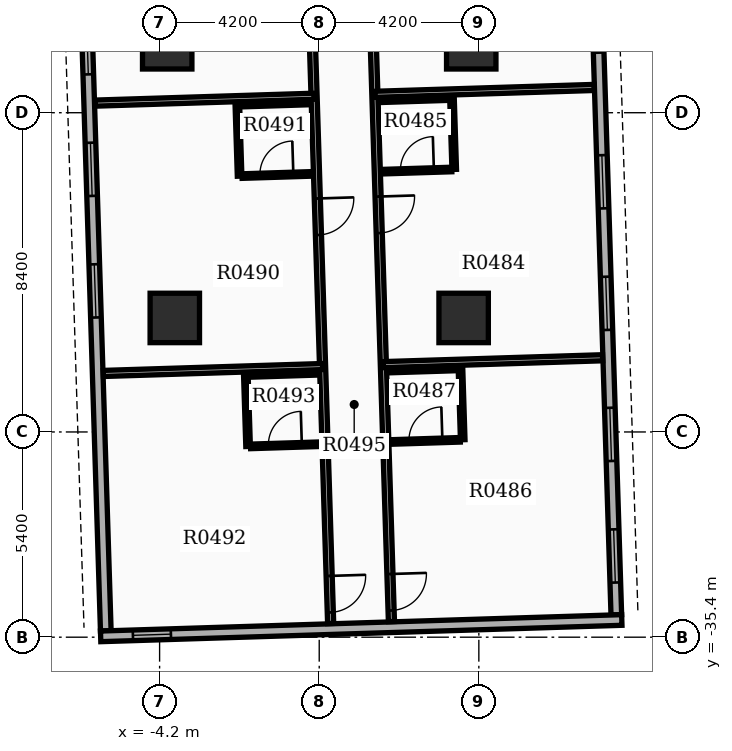
"""IFC4 building model, lengths in metres.
Left out: names, types, materials, properties, quantities, classifications, styles, units other than length and angle.
Written with IfcOpenShell. Run it as: python <this file> out.ifc"""

import sys

from ifc_helpers import new_model, si_unit, direction, frame, frame_2d, origin, origin_2d, place, context, subcontext, project, spatial, rectangle, extrude, element, fill, save


model = new_model("IFC4")
c1 = context("Model", 3, precision=1e-05, world=origin(), true_north=direction((0.0, 1.0)))
c2 = subcontext(c1, "Body", "Model", "MODEL_VIEW")
j1 = project(units=[si_unit("LENGTHUNIT", "METRE"), si_unit("PLANEANGLEUNIT", "RADIAN")], contexts=[c1])
p1 = place(None, origin())
s1 = spatial("IfcSite", under=j1, at=p1, CompositionType="ELEMENT")
p2 = place(p1, origin())
s2 = spatial("IfcBuilding", under=s1, at=p2, CompositionType="ELEMENT")
p3 = place(p2, frame((0.0, 0.0, 31.5)))
s3 = spatial("IfcBuildingStorey", under=s2, at=p3, CompositionType="ELEMENT", Elevation=31.5)
for number, where, z_axis, x_axis in (
    (1, (-4.0, -19.8, 0.0), (0.0, 0.0, 1.0), (1.0, 0.0, 0.0)),
    (2, (4.0, -19.8, 0.0), (0.0, 0.0, 1.0), (1.0, 0.0, 0.0)),
    (3, (-3.8, -27.0, 0.0), (0.0, 0.0, 1.0), (1.0, 0.0, 0.0)),
    (4, (3.8, -27.0, 0.0), (0.0, 0.0, 1.0), (1.0, 0.0, 0.0)),
):
    element("IfcColumn", number, at=place(p3, frame(where, z_axis=z_axis, x_axis=x_axis)), inside=s3, PredefinedType="COLUMN", context=c2, shape_type="SweptSolid", body=[
        extrude(rectangle(XDim=1.3, YDim=1.3, at=origin_2d()), origin(), (0.0, 0.0, 1.0), 3.9),
    ])
p4 = place(p3, frame((-6.247, -15.144, 0.0), z_axis=(0.0, 0.0, 1.0), x_axis=(0.031398187845, -0.999506955354, 0.0)))
e5 = element("IfcWall", 5, at=p4, inside=s3, PredefinedType="STANDARD", context=c2, shape_type="SweptSolid", body=[
    extrude(rectangle(XDim=20.1, YDim=0.28, at=frame_2d((10.05, 0.0))), origin(), (0.0, 0.0, 1.0), 2.91),
])
p5 = place(p4, frame((0.85, 0.0, 0.8)))
e6 = element("IfcOpeningElement", 6, at=p5, cuts=e5, PredefinedType="OPENING", context=c2, shape_type="SweptSolid", body=[
    extrude(rectangle(XDim=1.4, YDim=1.6, at=frame_2d((0.7, 0.8))), frame((0.0, 0.15, 0.0), z_axis=(0.0, -1.0, 0.0), x_axis=(1.0, 0.0, 0.0)), (0.0, 0.0, 1.0), 0.3),
])
p6 = place(p4, frame((4.05, 0.0, 0.8)))
e7 = element("IfcOpeningElement", 7, at=p6, cuts=e5, PredefinedType="OPENING", context=c2, shape_type="SweptSolid", body=[
    extrude(rectangle(XDim=1.4, YDim=1.6, at=frame_2d((0.7, 0.8))), frame((0.0, 0.15, 0.0), z_axis=(0.0, -1.0, 0.0), x_axis=(1.0, 0.0, 0.0)), (0.0, 0.0, 1.0), 0.3),
])
p7 = place(p4, frame((7.25, 0.0, 0.8)))
e8 = element("IfcOpeningElement", 8, at=p7, cuts=e5, PredefinedType="OPENING", context=c2, shape_type="SweptSolid", body=[
    extrude(rectangle(XDim=1.4, YDim=1.6, at=frame_2d((0.7, 0.8))), frame((0.0, 0.15, 0.0), z_axis=(0.0, -1.0, 0.0), x_axis=(1.0, 0.0, 0.0)), (0.0, 0.0, 1.0), 0.3),
])
p8 = place(p4, frame((10.45, 0.0, 0.8)))
e9 = element("IfcOpeningElement", 9, at=p8, cuts=e5, PredefinedType="OPENING", context=c2, shape_type="SweptSolid", body=[
    extrude(rectangle(XDim=1.4, YDim=1.6, at=frame_2d((0.7, 0.8))), frame((0.0, 0.15, 0.0), z_axis=(0.0, -1.0, 0.0), x_axis=(1.0, 0.0, 0.0)), (0.0, 0.0, 1.0), 0.3),
])
p9 = place(p3, frame((7.817, -34.812, 0.0), z_axis=(0.0, 0.0, 1.0), x_axis=(-0.031410322165, 0.999506574096, 0.0)))
e10 = element("IfcWall", 10, at=p9, inside=s3, PredefinedType="STANDARD", context=c2, shape_type="SweptSolid", body=[
    extrude(rectangle(XDim=20.1, YDim=0.28, at=frame_2d((10.05, 0.0))), origin(), (0.0, 0.0, 1.0), 2.91),
])
p10 = place(p9, frame((0.85, 0.0, 0.8)))
e11 = element("IfcOpeningElement", 11, at=p10, cuts=e10, PredefinedType="OPENING", context=c2, shape_type="SweptSolid", body=[
    extrude(rectangle(XDim=1.4, YDim=1.6, at=frame_2d((0.7, 0.8))), frame((0.0, 0.15, 0.0), z_axis=(0.0, -1.0, 0.0), x_axis=(1.0, 0.0, 0.0)), (0.0, 0.0, 1.0), 0.3),
])
p11 = place(p9, frame((4.05, 0.0, 0.8)))
e12 = element("IfcOpeningElement", 12, at=p11, cuts=e10, PredefinedType="OPENING", context=c2, shape_type="SweptSolid", body=[
    extrude(rectangle(XDim=1.4, YDim=1.6, at=frame_2d((0.7, 0.8))), frame((0.0, 0.15, 0.0), z_axis=(0.0, -1.0, 0.0), x_axis=(1.0, 0.0, 0.0)), (0.0, 0.0, 1.0), 0.3),
])
p12 = place(p9, frame((7.5, 0.0, 0.8)))
e13 = element("IfcOpeningElement", 13, at=p12, cuts=e10, PredefinedType="OPENING", context=c2, shape_type="SweptSolid", body=[
    extrude(rectangle(XDim=1.4, YDim=1.6, at=frame_2d((0.7, 0.8))), frame((0.0, 0.15, 0.0), z_axis=(0.0, -1.0, 0.0), x_axis=(1.0, 0.0, 0.0)), (0.0, 0.0, 1.0), 0.3),
])
p13 = place(p9, frame((10.7, 0.0, 0.8)))
e14 = element("IfcOpeningElement", 14, at=p13, cuts=e10, PredefinedType="OPENING", context=c2, shape_type="SweptSolid", body=[
    extrude(rectangle(XDim=1.4, YDim=1.6, at=frame_2d((0.7, 0.8))), frame((0.0, 0.15, 0.0), z_axis=(0.0, -1.0, 0.0), x_axis=(1.0, 0.0, 0.0)), (0.0, 0.0, 1.0), 0.3),
])
p14 = place(p9, frame((14.799, 0.0, 0.85)))
e15 = element("IfcOpeningElement", 15, at=p14, cuts=e10, PredefinedType="OPENING", context=c2, shape_type="SweptSolid", body=[
    extrude(rectangle(XDim=1.2, YDim=1.6, at=frame_2d((0.6, 0.8))), frame((0.0, 0.15, 0.0), z_axis=(0.0, -1.0, 0.0), x_axis=(1.0, 0.0, 0.0)), (0.0, 0.0, 1.0), 0.3),
])
p15 = place(p3, frame((-5.752, -35.378, 0.0), z_axis=(0.0, 0.0, 1.0), x_axis=(0.999506679556, 0.031406966164, 0.0)))
e16 = element("IfcWall", 16, at=p15, inside=s3, PredefinedType="STANDARD", context=c2, shape_type="SweptSolid", body=[
    extrude(rectangle(XDim=13.72, YDim=0.28, at=frame_2d((6.86, 0.0))), origin(), (0.0, 0.0, 1.0), 2.91),
])
p16 = place(p15, frame((0.85, 0.0, 0.85)))
e17 = element("IfcOpeningElement", 17, at=p16, cuts=e16, PredefinedType="OPENING", context=c2, shape_type="SweptSolid", body=[
    extrude(rectangle(XDim=1.0, YDim=1.5, at=frame_2d((0.5, 0.75))), frame((0.0, 0.15, 0.0), z_axis=(0.0, -1.0, 0.0), x_axis=(1.0, 0.0, 0.0)), (0.0, 0.0, 1.0), 0.3),
])
p17 = place(p3, frame((1.266, -14.817, 0.0), z_axis=(0.0, 0.0, 1.0), x_axis=(0.031403565719, -0.9995067864, 0.0)))
e18 = element("IfcWall", 18, at=p17, inside=s3, PredefinedType="PARTITIONING", context=c2, shape_type="SweptSolid", body=[
    extrude(rectangle(XDim=20.182, YDim=0.16, at=frame_2d((10.091, 0.0))), origin(), (0.0, 0.0, 1.0), 2.9),
])
p18 = place(p17, frame((2.61, 0.0, 0.0)))
e19 = element("IfcOpeningElement", 19, at=p18, cuts=e18, PredefinedType="OPENING", context=c2, shape_type="SweptSolid", body=[
    extrude(rectangle(XDim=0.96, YDim=2.15, at=frame_2d((0.48, 1.075))), frame((0.0, 0.09, 0.0), z_axis=(0.0, -1.0, 0.0), x_axis=(1.0, 0.0, 0.0)), (0.0, 0.0, 1.0), 0.18),
])
p19 = place(p17, frame((8.994, 0.0, 0.0)))
e20 = element("IfcOpeningElement", 20, at=p19, cuts=e18, PredefinedType="OPENING", context=c2, shape_type="SweptSolid", body=[
    extrude(rectangle(XDim=0.96, YDim=2.15, at=frame_2d((0.48, 1.075))), frame((0.0, 0.09, 0.0), z_axis=(0.0, -1.0, 0.0), x_axis=(1.0, 0.0, 0.0)), (0.0, 0.0, 1.0), 0.18),
])
p20 = place(p17, frame((18.93, 0.0, 0.0)))
e21 = element("IfcOpeningElement", 21, at=p20, cuts=e18, PredefinedType="OPENING", context=c2, shape_type="SweptSolid", body=[
    extrude(rectangle(XDim=0.96, YDim=2.15, at=frame_2d((0.48, 1.075))), frame((0.0, 0.09, 0.0), z_axis=(0.0, -1.0, 0.0), x_axis=(1.0, 0.0, 0.0)), (0.0, 0.0, 1.0), 0.18),
])
p21 = place(p3, frame((1.464, -21.116, 0.0), z_axis=(0.0, 0.0, 1.0), x_axis=(0.999506032581, 0.031427548972, 0.0)))
e22 = element("IfcWall", 22, at=p21, inside=s3, PredefinedType="PARTITIONING", context=c2, shape_type="SweptSolid", body=[
    extrude(rectangle(XDim=5.772, YDim=0.16, at=frame_2d((2.886, 0.0))), origin(), (0.0, 0.0, 1.0), 2.9),
])
p22 = place(p3, frame((1.688, -28.229, 0.0), z_axis=(0.0, 0.0, 1.0), x_axis=(0.999506074356, 0.031426220357, 0.0)))
e23 = element("IfcWall", 23, at=p22, inside=s3, PredefinedType="PARTITIONING", context=c2, shape_type="SweptSolid", body=[
    extrude(rectangle(XDim=5.772, YDim=0.16, at=frame_2d((2.886, 0.0))), origin(), (0.0, 0.0, 1.0), 2.9),
])
p23 = place(p3, frame((1.668, -23.151, 0.0), z_axis=(0.0, 0.0, 1.0), x_axis=(0.999511421504, 0.031255692016, 0.0)))
e24 = element("IfcWall", 24, at=p23, inside=s3, PredefinedType="PARTITIONING", context=c2, shape_type="SweptSolid", body=[
    extrude(rectangle(XDim=1.82, YDim=0.12, at=frame_2d((0.91, 0.0))), origin(), (0.0, 0.0, 1.0), 2.9),
])
p24 = place(p23, frame((0.47, 0.0, 0.0)))
e25 = element("IfcOpeningElement", 25, at=p24, cuts=e24, PredefinedType="OPENING", context=c2, shape_type="SweptSolid", body=[
    extrude(rectangle(XDim=0.88, YDim=2.1, at=frame_2d((0.44, 1.05))), frame((0.0, 0.07, 0.0), z_axis=(0.0, -1.0, 0.0), x_axis=(1.0, 0.0, 0.0)), (0.0, 0.0, 1.0), 0.14),
])
p25 = place(p3, frame((1.609, -21.272, 0.0), z_axis=(0.0, 0.0, 1.0), x_axis=(0.999507221803, 0.031389704724, 0.0)))
e26 = element("IfcWall", 26, at=p25, inside=s3, PredefinedType="PARTITIONING", context=c2, shape_type="SweptSolid", body=[
    extrude(rectangle(XDim=1.82, YDim=0.12, at=frame_2d((0.91, 0.0))), origin(), (0.0, 0.0, 1.0), 2.9),
])
p26 = place(p3, frame((3.493, -21.213, 0.0), z_axis=(0.0, 0.0, 1.0), x_axis=(0.031425292588, -0.999506103526, 0.0)))
e27 = element("IfcWall", 27, at=p26, inside=s3, PredefinedType="PARTITIONING", context=c2, shape_type="SweptSolid", body=[
    extrude(rectangle(XDim=1.88, YDim=0.12, at=frame_2d((0.94, 0.0))), origin(), (0.0, 0.0, 1.0), 2.9),
])
p27 = place(p3, frame((1.892, -30.263, 0.0), z_axis=(0.0, 0.0, 1.0), x_axis=(0.999507221803, 0.031389704724, 0.0)))
e28 = element("IfcWall", 28, at=p27, inside=s3, PredefinedType="PARTITIONING", context=c2, shape_type="SweptSolid", body=[
    extrude(rectangle(XDim=1.82, YDim=0.12, at=frame_2d((0.91, 0.0))), origin(), (0.0, 0.0, 1.0), 2.9),
])
p28 = place(p27, frame((0.47, 0.0, 0.0)))
e29 = element("IfcOpeningElement", 29, at=p28, cuts=e28, PredefinedType="OPENING", context=c2, shape_type="SweptSolid", body=[
    extrude(rectangle(XDim=0.88, YDim=2.1, at=frame_2d((0.44, 1.05))), frame((0.0, 0.07, 0.0), z_axis=(0.0, -1.0, 0.0), x_axis=(1.0, 0.0, 0.0)), (0.0, 0.0, 1.0), 0.14),
])
p29 = place(p3, frame((1.833, -28.385, 0.0), z_axis=(0.0, 0.0, 1.0), x_axis=(0.999507221803, 0.031389704724, 0.0)))
e30 = element("IfcWall", 30, at=p29, inside=s3, PredefinedType="PARTITIONING", context=c2, shape_type="SweptSolid", body=[
    extrude(rectangle(XDim=1.82, YDim=0.12, at=frame_2d((0.91, 0.0))), origin(), (0.0, 0.0, 1.0), 2.9),
])
p30 = place(p3, frame((3.717, -28.325, 0.0), z_axis=(0.0, 0.0, 1.0), x_axis=(0.031425292588, -0.999506103526, 0.0)))
e31 = element("IfcWall", 31, at=p30, inside=s3, PredefinedType="PARTITIONING", context=c2, shape_type="SweptSolid", body=[
    extrude(rectangle(XDim=1.88, YDim=0.12, at=frame_2d((0.94, 0.0))), origin(), (0.0, 0.0, 1.0), 2.9),
])
p31 = place(p3, frame((-0.333, -14.868, 0.0), z_axis=(0.0, 0.0, 1.0), x_axis=(0.031416030536, -0.99950639469, 0.0)))
e32 = element("IfcWall", 32, at=p31, inside=s3, PredefinedType="PARTITIONING", context=c2, shape_type="SweptSolid", body=[
    extrude(rectangle(XDim=20.182, YDim=0.16, at=frame_2d((10.091, 0.0))), origin(), (0.0, 0.0, 1.0), 2.9),
])
p32 = place(p31, frame((2.61, 0.0, 0.0)))
e33 = element("IfcOpeningElement", 33, at=p32, cuts=e32, PredefinedType="OPENING", context=c2, shape_type="SweptSolid", body=[
    extrude(rectangle(XDim=0.96, YDim=2.15, at=frame_2d((0.48, 1.075))), frame((0.0, 0.09, 0.0), z_axis=(0.0, -1.0, 0.0), x_axis=(1.0, 0.0, 0.0)), (0.0, 0.0, 1.0), 0.18),
])
p33 = place(p31, frame((8.994, 0.0, 0.0)))
e34 = element("IfcOpeningElement", 34, at=p33, cuts=e32, PredefinedType="OPENING", context=c2, shape_type="SweptSolid", body=[
    extrude(rectangle(XDim=0.96, YDim=2.15, at=frame_2d((0.48, 1.075))), frame((0.0, 0.09, 0.0), z_axis=(0.0, -1.0, 0.0), x_axis=(1.0, 0.0, 0.0)), (0.0, 0.0, 1.0), 0.18),
])
p34 = place(p31, frame((18.93, 0.0, 0.0)))
e35 = element("IfcOpeningElement", 35, at=p34, cuts=e32, PredefinedType="OPENING", context=c2, shape_type="SweptSolid", body=[
    extrude(rectangle(XDim=0.96, YDim=2.15, at=frame_2d((0.48, 1.075))), frame((0.0, 0.09, 0.0), z_axis=(0.0, -1.0, 0.0), x_axis=(1.0, 0.0, 0.0)), (0.0, 0.0, 1.0), 0.18),
])
p35 = place(p3, frame((-0.135, -21.167, 0.0), z_axis=(0.0, 0.0, 1.0), x_axis=(-0.999507360361, -0.031385292484, 0.0)))
e36 = element("IfcWall", 36, at=p35, inside=s3, PredefinedType="PARTITIONING", context=c2, shape_type="SweptSolid", body=[
    extrude(rectangle(XDim=5.772, YDim=0.16, at=frame_2d((2.886, 0.0))), origin(), (0.0, 0.0, 1.0), 2.9),
])
p36 = place(p3, frame((0.088, -28.279, 0.0), z_axis=(0.0, 0.0, 1.0), x_axis=(-0.999507402024, -0.031383965651, 0.0)))
e37 = element("IfcWall", 37, at=p36, inside=s3, PredefinedType="PARTITIONING", context=c2, shape_type="SweptSolid", body=[
    extrude(rectangle(XDim=5.772, YDim=0.16, at=frame_2d((2.886, 0.0))), origin(), (0.0, 0.0, 1.0), 2.9),
])
p37 = place(p3, frame((-2.03, -23.267, 0.0), z_axis=(0.0, 0.0, 1.0), x_axis=(0.999511421504, 0.031255692016, 0.0)))
e38 = element("IfcWall", 38, at=p37, inside=s3, PredefinedType="PARTITIONING", context=c2, shape_type="SweptSolid", body=[
    extrude(rectangle(XDim=1.82, YDim=0.12, at=frame_2d((0.91, 0.0))), origin(), (0.0, 0.0, 1.0), 2.9),
])
p38 = place(p37, frame((0.47, 0.0, 0.0)))
e39 = element("IfcOpeningElement", 39, at=p38, cuts=e38, PredefinedType="OPENING", context=c2, shape_type="SweptSolid", body=[
    extrude(rectangle(XDim=0.88, YDim=2.1, at=frame_2d((0.44, 1.05))), frame((0.0, 0.07, 0.0), z_axis=(0.0, -1.0, 0.0), x_axis=(1.0, 0.0, 0.0)), (0.0, 0.0, 1.0), 0.14),
])
p39 = place(p3, frame((-2.089, -21.388, 0.0), z_axis=(0.0, 0.0, 1.0), x_axis=(0.999507221803, 0.031389704724, 0.0)))
e40 = element("IfcWall", 40, at=p39, inside=s3, PredefinedType="PARTITIONING", context=c2, shape_type="SweptSolid", body=[
    extrude(rectangle(XDim=1.82, YDim=0.12, at=frame_2d((0.91, 0.0))), origin(), (0.0, 0.0, 1.0), 2.9),
])
p40 = place(p3, frame((-2.154, -21.39, 0.0), z_axis=(0.0, 0.0, 1.0), x_axis=(0.031425292588, -0.999506103526, 0.0)))
e41 = element("IfcWall", 41, at=p40, inside=s3, PredefinedType="PARTITIONING", context=c2, shape_type="SweptSolid", body=[
    extrude(rectangle(XDim=1.88, YDim=0.12, at=frame_2d((0.94, 0.0))), origin(), (0.0, 0.0, 1.0), 2.9),
])
p41 = place(p3, frame((-1.807, -30.38, 0.0), z_axis=(0.0, 0.0, 1.0), x_axis=(0.999507221803, 0.031389704724, 0.0)))
e42 = element("IfcWall", 42, at=p41, inside=s3, PredefinedType="PARTITIONING", context=c2, shape_type="SweptSolid", body=[
    extrude(rectangle(XDim=1.82, YDim=0.12, at=frame_2d((0.91, 0.0))), origin(), (0.0, 0.0, 1.0), 2.9),
])
p42 = place(p41, frame((0.47, 0.0, 0.0)))
e43 = element("IfcOpeningElement", 43, at=p42, cuts=e42, PredefinedType="OPENING", context=c2, shape_type="SweptSolid", body=[
    extrude(rectangle(XDim=0.88, YDim=2.1, at=frame_2d((0.44, 1.05))), frame((0.0, 0.07, 0.0), z_axis=(0.0, -1.0, 0.0), x_axis=(1.0, 0.0, 0.0)), (0.0, 0.0, 1.0), 0.14),
])
p43 = place(p3, frame((-1.866, -28.501, 0.0), z_axis=(0.0, 0.0, 1.0), x_axis=(0.999507221803, 0.031389704724, 0.0)))
e44 = element("IfcWall", 44, at=p43, inside=s3, PredefinedType="PARTITIONING", context=c2, shape_type="SweptSolid", body=[
    extrude(rectangle(XDim=1.82, YDim=0.12, at=frame_2d((0.91, 0.0))), origin(), (0.0, 0.0, 1.0), 2.9),
])
p44 = place(p3, frame((-1.931, -28.503, 0.0), z_axis=(0.0, 0.0, 1.0), x_axis=(0.031425292588, -0.999506103526, 0.0)))
e45 = element("IfcWall", 45, at=p44, inside=s3, PredefinedType="PARTITIONING", context=c2, shape_type="SweptSolid", body=[
    extrude(rectangle(XDim=1.88, YDim=0.12, at=frame_2d((0.94, 0.0))), origin(), (0.0, 0.0, 1.0), 2.9),
])
p45 = place(p6, origin())
e46 = element("IfcWindow", 46, at=p45, inside=s3, PartitioningType="SINGLE_PANEL", PredefinedType="WINDOW", context=c2, shape_type="SweptSolid", body=[
    extrude(rectangle(XDim=1.4, YDim=1.6, at=frame_2d((0.7, 0.8))), frame((0.0, 0.03, 0.0), z_axis=(0.0, -1.0, 0.0), x_axis=(1.0, 0.0, 0.0)), (0.0, 0.0, 1.0), 0.06),
])
fill(e7, e46)
p46 = place(p7, origin())
e47 = element("IfcWindow", 47, at=p46, inside=s3, PartitioningType="SINGLE_PANEL", PredefinedType="WINDOW", context=c2, shape_type="SweptSolid", body=[
    extrude(rectangle(XDim=1.4, YDim=1.6, at=frame_2d((0.7, 0.8))), frame((0.0, 0.03, 0.0), z_axis=(0.0, -1.0, 0.0), x_axis=(1.0, 0.0, 0.0)), (0.0, 0.0, 1.0), 0.06),
])
fill(e8, e47)
p47 = place(p8, origin())
e48 = element("IfcWindow", 48, at=p47, inside=s3, PartitioningType="SINGLE_PANEL", PredefinedType="WINDOW", context=c2, shape_type="SweptSolid", body=[
    extrude(rectangle(XDim=1.4, YDim=1.6, at=frame_2d((0.7, 0.8))), frame((0.0, 0.03, 0.0), z_axis=(0.0, -1.0, 0.0), x_axis=(1.0, 0.0, 0.0)), (0.0, 0.0, 1.0), 0.06),
])
fill(e9, e48)
p48 = place(p10, origin())
e49 = element("IfcWindow", 49, at=p48, inside=s3, PartitioningType="SINGLE_PANEL", PredefinedType="WINDOW", context=c2, shape_type="SweptSolid", body=[
    extrude(rectangle(XDim=1.4, YDim=1.6, at=frame_2d((0.7, 0.8))), frame((0.0, 0.03, 0.0), z_axis=(0.0, -1.0, 0.0), x_axis=(1.0, 0.0, 0.0)), (0.0, 0.0, 1.0), 0.06),
])
fill(e11, e49)
p49 = place(p11, origin())
e50 = element("IfcWindow", 50, at=p49, inside=s3, PartitioningType="SINGLE_PANEL", PredefinedType="WINDOW", context=c2, shape_type="SweptSolid", body=[
    extrude(rectangle(XDim=1.4, YDim=1.6, at=frame_2d((0.7, 0.8))), frame((0.0, 0.03, 0.0), z_axis=(0.0, -1.0, 0.0), x_axis=(1.0, 0.0, 0.0)), (0.0, 0.0, 1.0), 0.06),
])
fill(e12, e50)
p50 = place(p12, origin())
e51 = element("IfcWindow", 51, at=p50, inside=s3, PartitioningType="SINGLE_PANEL", PredefinedType="WINDOW", context=c2, shape_type="SweptSolid", body=[
    extrude(rectangle(XDim=1.4, YDim=1.6, at=frame_2d((0.7, 0.8))), frame((0.0, 0.03, 0.0), z_axis=(0.0, -1.0, 0.0), x_axis=(1.0, 0.0, 0.0)), (0.0, 0.0, 1.0), 0.06),
])
fill(e13, e51)
p51 = place(p13, origin())
e52 = element("IfcWindow", 52, at=p51, inside=s3, PartitioningType="SINGLE_PANEL", PredefinedType="WINDOW", context=c2, shape_type="SweptSolid", body=[
    extrude(rectangle(XDim=1.4, YDim=1.6, at=frame_2d((0.7, 0.8))), frame((0.0, 0.03, 0.0), z_axis=(0.0, -1.0, 0.0), x_axis=(1.0, 0.0, 0.0)), (0.0, 0.0, 1.0), 0.06),
])
fill(e14, e52)
p52 = place(p16, origin())
e53 = element("IfcWindow", 53, at=p52, inside=s3, PartitioningType="SINGLE_PANEL", PredefinedType="WINDOW", context=c2, shape_type="SweptSolid", body=[
    extrude(rectangle(XDim=1.0, YDim=1.5, at=frame_2d((0.5, 0.75))), frame((0.0, 0.03, 0.0), z_axis=(0.0, -1.0, 0.0), x_axis=(1.0, 0.0, 0.0)), (0.0, 0.0, 1.0), 0.06),
])
fill(e17, e53)
p53 = place(p14, origin())
e54 = element("IfcWindow", 54, at=p53, inside=s3, PartitioningType="SINGLE_PANEL", PredefinedType="WINDOW", context=c2, shape_type="SweptSolid", body=[
    extrude(rectangle(XDim=1.2, YDim=1.6, at=frame_2d((0.6, 0.8))), frame((0.0, 0.03, 0.0), z_axis=(0.0, -1.0, 0.0), x_axis=(1.0, 0.0, 0.0)), (0.0, 0.0, 1.0), 0.06),
])
fill(e15, e54)
p54 = place(p19, origin())
e55 = element("IfcDoor", 55, at=p54, inside=s3, OperationType="SINGLE_SWING_LEFT", PredefinedType="DOOR", context=c2, shape_type="SweptSolid", body=[
    extrude(rectangle(XDim=0.96, YDim=2.15, at=frame_2d((0.48, 1.075))), frame((0.0, 0.025, 0.0), z_axis=(0.0, -1.0, 0.0), x_axis=(1.0, 0.0, 0.0)), (0.0, 0.0, 1.0), 0.05),
])
fill(e20, e55)
p55 = place(p24, origin())
e56 = element("IfcDoor", 56, at=p55, inside=s3, OperationType="SINGLE_SWING_RIGHT", PredefinedType="DOOR", context=c2, shape_type="SweptSolid", body=[
    extrude(rectangle(XDim=0.88, YDim=2.1, at=frame_2d((0.44, 1.05))), frame((0.0, 0.025, 0.0), z_axis=(0.0, -1.0, 0.0), x_axis=(1.0, 0.0, 0.0)), (0.0, 0.0, 1.0), 0.05),
])
fill(e25, e56)
p56 = place(p20, origin())
e57 = element("IfcDoor", 57, at=p56, inside=s3, OperationType="SINGLE_SWING_LEFT", PredefinedType="DOOR", context=c2, shape_type="SweptSolid", body=[
    extrude(rectangle(XDim=0.96, YDim=2.15, at=frame_2d((0.48, 1.075))), frame((0.0, 0.025, 0.0), z_axis=(0.0, -1.0, 0.0), x_axis=(1.0, 0.0, 0.0)), (0.0, 0.0, 1.0), 0.05),
])
fill(e21, e57)
p57 = place(p28, origin())
e58 = element("IfcDoor", 58, at=p57, inside=s3, OperationType="SINGLE_SWING_RIGHT", PredefinedType="DOOR", context=c2, shape_type="SweptSolid", body=[
    extrude(rectangle(XDim=0.88, YDim=2.1, at=frame_2d((0.44, 1.05))), frame((0.0, 0.025, 0.0), z_axis=(0.0, -1.0, 0.0), x_axis=(1.0, 0.0, 0.0)), (0.0, 0.0, 1.0), 0.05),
])
fill(e29, e58)
p58 = place(p33, origin())
e59 = element("IfcDoor", 59, at=p58, inside=s3, OperationType="SINGLE_SWING_LEFT", PredefinedType="DOOR", context=c2, shape_type="SweptSolid", body=[
    extrude(rectangle(XDim=0.96, YDim=2.15, at=frame_2d((0.48, 1.075))), frame((0.0, 0.025, 0.0), z_axis=(0.0, -1.0, 0.0), x_axis=(1.0, 0.0, 0.0)), (0.0, 0.0, 1.0), 0.05),
])
fill(e34, e59)
p59 = place(p38, origin())
e60 = element("IfcDoor", 60, at=p59, inside=s3, OperationType="SINGLE_SWING_RIGHT", PredefinedType="DOOR", context=c2, shape_type="SweptSolid", body=[
    extrude(rectangle(XDim=0.88, YDim=2.1, at=frame_2d((0.44, 1.05))), frame((0.0, 0.025, 0.0), z_axis=(0.0, -1.0, 0.0), x_axis=(1.0, 0.0, 0.0)), (0.0, 0.0, 1.0), 0.05),
])
fill(e39, e60)
p60 = place(p34, origin())
e61 = element("IfcDoor", 61, at=p60, inside=s3, OperationType="SINGLE_SWING_LEFT", PredefinedType="DOOR", context=c2, shape_type="SweptSolid", body=[
    extrude(rectangle(XDim=0.96, YDim=2.15, at=frame_2d((0.48, 1.075))), frame((0.0, 0.025, 0.0), z_axis=(0.0, -1.0, 0.0), x_axis=(1.0, 0.0, 0.0)), (0.0, 0.0, 1.0), 0.05),
])
fill(e35, e61)
p61 = place(p42, origin())
e62 = element("IfcDoor", 62, at=p61, inside=s3, OperationType="SINGLE_SWING_RIGHT", PredefinedType="DOOR", context=c2, shape_type="SweptSolid", body=[
    extrude(rectangle(XDim=0.88, YDim=2.1, at=frame_2d((0.44, 1.05))), frame((0.0, 0.025, 0.0), z_axis=(0.0, -1.0, 0.0), x_axis=(1.0, 0.0, 0.0)), (0.0, 0.0, 1.0), 0.05),
])
fill(e43, e62)
save(model, sys.argv[1])
